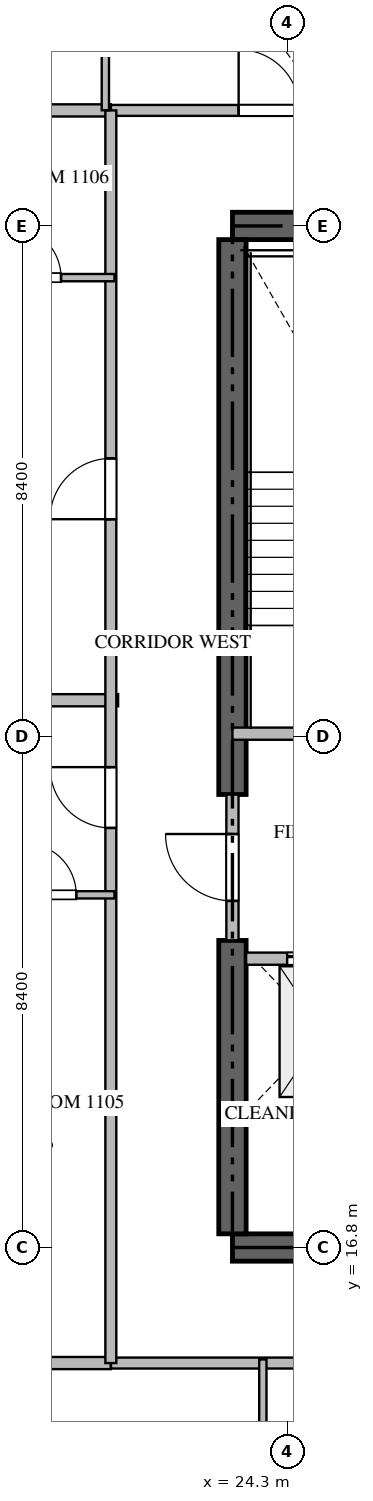
"""IFC4 building model, lengths in metres.
Left out: names, types, materials, properties, quantities, classifications, styles, units other than length and angle.
Written with IfcOpenShell. Run it as: python <this file> out.ifc"""

import sys

from ifc_helpers import new_model, si_unit, direction, frame, frame_2d, origin, place, context, subcontext, project, spatial, rectangle, extrude, source, transform, mapped, element, fill, save


model = new_model("IFC4")
c1 = context("Model", 3, precision=1e-05, world=origin(), true_north=direction((0.0, 1.0)))
c2 = subcontext(c1, "Body", "Model", "MODEL_VIEW")
j1 = project(units=[si_unit("LENGTHUNIT", "METRE"), si_unit("PLANEANGLEUNIT", "RADIAN")], contexts=[c1])
p1 = place(None, origin())
s1 = spatial("IfcSite", under=j1, at=p1, CompositionType="ELEMENT")
p2 = place(p1, origin())
s2 = spatial("IfcBuilding", under=s1, at=p2, CompositionType="ELEMENT")
p3 = place(p2, frame((0.0, 0.0, 49.2)))
s3 = spatial("IfcBuildingStorey", under=s2, at=p3, CompositionType="ELEMENT", Elevation=49.2)
for number, where, z_axis, x_axis in (
    (1, (23.4, 16.8, -0.26), (0.0, 0.0, 1.0), (1.0, 0.0, 0.0)),
    (2, (41.4, 33.6, -0.26), (0.0, 0.0, 1.0), (-1.0, 0.0, 0.0)),
):
    element("IfcWall", number, at=place(p3, frame(where, z_axis=z_axis, x_axis=x_axis)), inside=s3, PredefinedType="SHEAR", context=c2, shape_type="SweptSolid", body=[
        extrude(rectangle(XDim=18.0, YDim=0.45, at=frame_2d((9.0, 0.0))), origin(), (0.0, 0.0, 1.0), 3.748),
    ])
p4 = place(p3, frame((23.4, 17.025, -0.26), z_axis=(0.0, 0.0, 1.0), x_axis=(0.0, 1.0, 0.0)))
e3 = element("IfcWall", 3, at=p4, inside=s3, PredefinedType="SHEAR", context=c2, shape_type="SweptSolid", body=[
    extrude(rectangle(XDim=4.825, YDim=0.45, at=frame_2d((2.413, 0.0))), origin(), (0.0, 0.0, 1.0), 3.748),
])
p5 = place(p3, frame((23.4, 24.25, -0.26), z_axis=(0.0, 0.0, 1.0), x_axis=(0.0, 1.0, 0.0)))
e4 = element("IfcWall", 4, at=p5, inside=s3, PredefinedType="SHEAR", context=c2, shape_type="SweptSolid", body=[
    extrude(rectangle(XDim=9.125, YDim=0.45, at=frame_2d((4.562, 0.0))), origin(), (0.0, 0.0, 1.0), 3.748),
])
p6 = place(p3, frame((23.4, 25.25, 0.0), z_axis=(0.0, 0.0, 1.0), x_axis=(1.0, 0.0, 0.0)))
e5 = element("IfcWall", 5, at=p6, inside=s3, PredefinedType="STANDARD", context=c2, shape_type="SweptSolid", body=[
    extrude(rectangle(XDim=4.45, YDim=0.2, at=frame_2d((2.225, 0.0))), origin(), (0.0, 0.0, 1.0), 3.49),
])
p7 = place(p6, frame((1.65, 0.0, 0.0)))
e6 = element("IfcOpeningElement", 6, at=p7, cuts=e5, PredefinedType="OPENING", context=c2, shape_type="SweptSolid", body=[
    extrude(rectangle(XDim=1.1, YDim=2.15, at=frame_2d((0.55, 1.075))), frame((0.0, 0.11, 0.0), z_axis=(0.0, -1.0, 0.0), x_axis=(1.0, 0.0, 0.0)), (0.0, 0.0, 1.0), 0.22),
])
p8 = place(p3, frame((23.625, 21.55, 0.0), z_axis=(0.0, 0.0, 1.0), x_axis=(1.0, 0.0, 0.0)))
e7 = element("IfcWall", 7, at=p8, inside=s3, PredefinedType="STANDARD", context=c2, shape_type="SweptSolid", body=[
    extrude(rectangle(XDim=2.425, YDim=0.2, at=frame_2d((1.212, 0.0))), origin(), (0.0, 0.0, 1.0), 3.49),
])
p9 = place(p8, frame((0.675, 0.0, 0.0)))
e8 = element("IfcOpeningElement", 8, at=p9, cuts=e7, PredefinedType="OPENING", context=c2, shape_type="SweptSolid", body=[
    extrude(rectangle(XDim=1.2, YDim=2.2, at=frame_2d((0.6, 1.1))), frame((0.0, 0.11, 0.0), z_axis=(0.0, -1.0, 0.0), x_axis=(1.0, 0.0, 0.0)), (0.0, 0.0, 1.0), 0.22),
])
p10 = place(p3, frame((23.625, 19.05, 0.0), z_axis=(0.0, 0.0, 1.0), x_axis=(1.0, 0.0, 0.0)))
e9 = element("IfcWall", 9, at=p10, inside=s3, PredefinedType="STANDARD", context=c2, shape_type="SweptSolid", body=[
    extrude(rectangle(XDim=2.425, YDim=0.2, at=frame_2d((1.212, 0.0))), origin(), (0.0, 0.0, 1.0), 3.49),
])
p11 = place(p3, frame((23.4, 21.852, 0.0), z_axis=(0.0, 0.0, 1.0), x_axis=(0.0, 1.0, 0.0)))
e10 = element("IfcWall", 10, at=p11, inside=s3, PredefinedType="STANDARD", context=c2, shape_type="SweptSolid", body=[
    extrude(rectangle(XDim=2.396, YDim=0.2, at=frame_2d((1.198, 0.0))), origin(), (0.0, 0.0, 1.0), 3.49),
])
p12 = place(p11, frame((0.648, 0.0, 0.0)))
e11 = element("IfcOpeningElement", 11, at=p12, cuts=e10, PredefinedType="OPENING", context=c2, shape_type="SweptSolid", body=[
    extrude(rectangle(XDim=1.1, YDim=2.15, at=frame_2d((0.55, 1.075))), frame((0.0, 0.11, 0.0), z_axis=(0.0, -1.0, 0.0), x_axis=(1.0, 0.0, 0.0)), (0.0, 0.0, 1.0), 0.22),
])
p13 = place(p3, frame((6.082, 25.8, 0.0), z_axis=(0.0, 0.0, 1.0), x_axis=(1.0, 0.0, 0.0)))
e12 = element("IfcWall", 12, at=p13, inside=s3, PredefinedType="PARTITIONING", context=c2, shape_type="SweptSolid", body=[
    extrude(rectangle(XDim=15.438, YDim=0.2, at=frame_2d((7.719, 0.0))), origin(), (0.0, 0.0, 1.0), 3.49),
])
for number, where, z_axis, x_axis in (
    (13, (6.082, 14.9, 0.0), (0.0, 0.0, 1.0), (1.0, 0.0, 0.0)),
    (14, (6.082, 35.5, 0.0), (0.0, 0.0, 1.0), (1.0, 0.0, 0.0)),
):
    element("IfcWall", number, at=place(p3, frame(where, z_axis=z_axis, x_axis=x_axis)), inside=s3, PredefinedType="PARTITIONING", context=c2, shape_type="SweptSolid", body=[
        extrude(rectangle(XDim=15.318, YDim=0.2, at=frame_2d((7.659, 0.0))), origin(), (0.0, 0.0, 1.0), 3.49),
    ])
p14 = place(p3, frame((21.402, 14.9, 0.0), z_axis=(0.0, 0.0, 1.0), x_axis=(1.0, 0.0, 0.0)))
e15 = element("IfcWall", 15, at=p14, inside=s3, PredefinedType="PARTITIONING", context=c2, shape_type="SweptSolid", body=[
    extrude(rectangle(XDim=21.996, YDim=0.18, at=frame_2d((10.998, 0.0))), origin(), (0.0, 0.0, 1.0), 3.49),
])
p15 = place(p14, frame((15.222, 0.0, 0.0)))
e16 = element("IfcOpeningElement", 16, at=p15, cuts=e15, PredefinedType="OPENING", context=c2, shape_type="SweptSolid", body=[
    extrude(rectangle(XDim=1.0, YDim=2.15, at=frame_2d((0.5, 1.075))), frame((0.0, 0.1, 0.0), z_axis=(0.0, -1.0, 0.0), x_axis=(1.0, 0.0, 0.0)), (0.0, 0.0, 1.0), 0.2),
])
p16 = place(p3, frame((21.402, 35.5, 0.0), z_axis=(0.0, 0.0, 1.0), x_axis=(1.0, 0.0, 0.0)))
e17 = element("IfcWall", 17, at=p16, inside=s3, PredefinedType="PARTITIONING", context=c2, shape_type="SweptSolid", body=[
    extrude(rectangle(XDim=21.996, YDim=0.18, at=frame_2d((10.998, 0.0))), origin(), (0.0, 0.0, 1.0), 3.49),
])
p17 = place(p16, frame((2.1, 0.0, 0.0)))
e18 = element("IfcOpeningElement", 18, at=p17, cuts=e17, PredefinedType="OPENING", context=c2, shape_type="SweptSolid", body=[
    extrude(rectangle(XDim=1.0, YDim=2.15, at=frame_2d((0.5, 1.075))), frame((0.0, 0.1, 0.0), z_axis=(0.0, -1.0, 0.0), x_axis=(1.0, 0.0, 0.0)), (0.0, 0.0, 1.0), 0.2),
])
p18 = place(p16, frame((14.214, 0.0, 0.0)))
e19 = element("IfcOpeningElement", 19, at=p18, cuts=e17, PredefinedType="OPENING", context=c2, shape_type="SweptSolid", body=[
    extrude(rectangle(XDim=1.0, YDim=2.15, at=frame_2d((0.5, 1.075))), frame((0.0, 0.1, 0.0), z_axis=(0.0, -1.0, 0.0), x_axis=(1.0, 0.0, 0.0)), (0.0, 0.0, 1.0), 0.2),
])
p19 = place(p16, frame((18.896, 0.0, 0.0)))
e20 = element("IfcOpeningElement", 20, at=p19, cuts=e17, PredefinedType="OPENING", context=c2, shape_type="SweptSolid", body=[
    extrude(rectangle(XDim=1.0, YDim=2.15, at=frame_2d((0.5, 1.075))), frame((0.0, 0.1, 0.0), z_axis=(0.0, -1.0, 0.0), x_axis=(1.0, 0.0, 0.0)), (0.0, 0.0, 1.0), 0.2),
])
p20 = place(p3, frame((21.4, 14.9, 0.0), z_axis=(0.0, 0.0, 1.0), x_axis=(0.0, 1.0, 0.0)))
e21 = element("IfcWall", 21, at=p20, inside=s3, PredefinedType="PARTITIONING", context=c2, shape_type="SweptSolid", body=[
    extrude(rectangle(XDim=20.6, YDim=0.18, at=frame_2d((10.3, 0.0))), origin(), (0.0, 0.0, 1.0), 3.49),
])
p21 = place(p20, frame((8.8, 0.0, 0.0)))
e22 = element("IfcOpeningElement", 22, at=p21, cuts=e21, PredefinedType="OPENING", context=c2, shape_type="SweptSolid", body=[
    extrude(rectangle(XDim=1.0, YDim=2.15, at=frame_2d((0.5, 1.075))), frame((0.0, 0.1, 0.0), z_axis=(0.0, -1.0, 0.0), x_axis=(1.0, 0.0, 0.0)), (0.0, 0.0, 1.0), 0.2),
])
p22 = place(p20, frame((13.877, 0.0, 0.0)))
e23 = element("IfcOpeningElement", 23, at=p22, cuts=e21, PredefinedType="OPENING", context=c2, shape_type="SweptSolid", body=[
    extrude(rectangle(XDim=1.0, YDim=2.15, at=frame_2d((0.5, 1.075))), frame((0.0, 0.1, 0.0), z_axis=(0.0, -1.0, 0.0), x_axis=(1.0, 0.0, 0.0)), (0.0, 0.0, 1.0), 0.2),
])
p23 = place(p3, frame((23.9, 12.752, 0.0), z_axis=(0.0, 0.0, 1.0), x_axis=(0.0, 1.0, 0.0)))
e24 = element("IfcWall", 24, at=p23, inside=s3, PredefinedType="PARTITIONING", context=c2, shape_type="SweptSolid", body=[
    extrude(rectangle(XDim=2.208, YDim=0.12, at=frame_2d((1.104, 0.0))), origin(), (0.0, 0.0, 1.0), 3.49),
])
p24 = place(p3, frame((21.31, 38.25, 0.0), z_axis=(0.0, 0.0, 1.0), x_axis=(0.0, -1.0, 0.0)))
e25 = element("IfcWall", 25, at=p24, inside=s3, PredefinedType="PARTITIONING", context=c2, shape_type="SweptSolid", body=[
    extrude(rectangle(XDim=2.748, YDim=0.12, at=frame_2d((1.374, 0.0))), origin(), (0.0, 0.0, 1.0), 3.49),
])
p25 = place(p3, frame((19.352, 22.6, 0.0), z_axis=(0.0, 0.0, 1.0), x_axis=(1.0, 0.0, 0.0)))
e26 = element("IfcWall", 26, at=p25, inside=s3, PredefinedType="PARTITIONING", context=c2, shape_type="SweptSolid", body=[
    extrude(rectangle(XDim=2.108, YDim=0.12, at=frame_2d((1.054, 0.0))), origin(), (0.0, 0.0, 1.0), 3.49),
])
p26 = place(p25, frame((0.629, 0.0, 0.0)))
e27 = element("IfcOpeningElement", 27, at=p26, cuts=e26, PredefinedType="OPENING", context=c2, shape_type="SweptSolid", body=[
    extrude(rectangle(XDim=0.85, YDim=2.1, at=frame_2d((0.425, 1.05))), frame((0.0, 0.07, 0.0), z_axis=(0.0, -1.0, 0.0), x_axis=(1.0, 0.0, 0.0)), (0.0, 0.0, 1.0), 0.14),
])
p27 = place(p3, frame((18.852, 32.75, 0.0), z_axis=(0.0, 0.0, 1.0), x_axis=(1.0, 0.0, 0.0)))
e28 = element("IfcWall", 28, at=p27, inside=s3, PredefinedType="PARTITIONING", context=c2, shape_type="SweptSolid", body=[
    extrude(rectangle(XDim=2.608, YDim=0.12, at=frame_2d((1.304, 0.0))), origin(), (0.0, 0.0, 1.0), 3.49),
])
p28 = place(p27, frame((0.879, 0.0, 0.0)))
e29 = element("IfcOpeningElement", 29, at=p28, cuts=e28, PredefinedType="OPENING", context=c2, shape_type="SweptSolid", body=[
    extrude(rectangle(XDim=0.85, YDim=2.1, at=frame_2d((0.425, 1.05))), frame((0.0, 0.07, 0.0), z_axis=(0.0, -1.0, 0.0), x_axis=(1.0, 0.0, 0.0)), (0.0, 0.0, 1.0), 0.14),
])
m1 = source(origin(), c2, "Body", "SweptSolid", [
    extrude(rectangle(XDim=1.2, YDim=2.2, at=frame_2d((0.6, 1.1))), frame((0.0, 0.025, 0.0), z_axis=(0.0, -1.0, 0.0), x_axis=(1.0, 0.0, 0.0)), (0.0, 0.0, 1.0), 0.05),
])
p29 = place(p9, origin())
e30 = element("IfcDoor", 30, at=p29, inside=s3, OperationType="DOUBLE_DOOR_SLIDING", PredefinedType="DOOR", context=c2, shape_type="MappedRepresentation", body=[
    mapped(m1, transform((0.0, 0.0, 0.0), scale=1.0)),
])
fill(e8, e30)
m2 = source(origin(), c2, "Body", "SweptSolid", [
    extrude(rectangle(XDim=1.1, YDim=2.15, at=frame_2d((0.55, 1.075))), frame((0.0, 0.025, 0.0), z_axis=(0.0, -1.0, 0.0), x_axis=(1.0, 0.0, 0.0)), (0.0, 0.0, 1.0), 0.05),
])
p30 = place(p12, origin())
e31 = element("IfcDoor", 31, at=p30, inside=s3, OperationType="SINGLE_SWING_RIGHT", PredefinedType="DOOR", context=c2, shape_type="MappedRepresentation", body=[
    mapped(m2, transform((0.0, 0.0, 0.0), scale=1.0)),
])
fill(e11, e31)
m3 = source(origin(), c2, "Body", "SweptSolid", [
    extrude(rectangle(XDim=1.0, YDim=2.15, at=frame_2d((0.5, 1.075))), frame((0.0, 0.025, 0.0), z_axis=(0.0, -1.0, 0.0), x_axis=(1.0, 0.0, 0.0)), (0.0, 0.0, 1.0), 0.05),
])
p31 = place(p17, origin())
e32 = element("IfcDoor", 32, at=p31, inside=s3, OperationType="SINGLE_SWING_LEFT", PredefinedType="DOOR", context=c2, shape_type="MappedRepresentation", body=[
    mapped(m3, transform((0.0, 0.0, 0.0), scale=1.0)),
])
fill(e18, e32)
p32 = place(p21, origin())
e33 = element("IfcDoor", 33, at=p32, inside=s3, OperationType="SINGLE_SWING_RIGHT", PredefinedType="DOOR", context=c2, shape_type="MappedRepresentation", body=[
    mapped(m3, transform((0.0, 0.0, 0.0), scale=1.0)),
])
fill(e22, e33)
p33 = place(p22, origin())
e34 = element("IfcDoor", 34, at=p33, inside=s3, OperationType="SINGLE_SWING_LEFT", PredefinedType="DOOR", context=c2, shape_type="MappedRepresentation", body=[
    mapped(m3, transform((0.0, 0.0, 0.0), scale=1.0)),
])
fill(e23, e34)
m4 = source(origin(), c2, "Body", "SweptSolid", [
    extrude(rectangle(XDim=0.85, YDim=2.1, at=frame_2d((0.425, 1.05))), frame((0.0, 0.025, 0.0), z_axis=(0.0, -1.0, 0.0), x_axis=(1.0, 0.0, 0.0)), (0.0, 0.0, 1.0), 0.05),
])
p34 = place(p26, origin())
e35 = element("IfcDoor", 35, at=p34, inside=s3, OperationType="SINGLE_SWING_LEFT", PredefinedType="DOOR", context=c2, shape_type="MappedRepresentation", body=[
    mapped(m4, transform((0.0, 0.0, 0.0), scale=1.0)),
])
fill(e27, e35)
p35 = place(p28, origin())
e36 = element("IfcDoor", 36, at=p35, inside=s3, OperationType="SINGLE_SWING_LEFT", PredefinedType="DOOR", context=c2, shape_type="MappedRepresentation", body=[
    mapped(m4, transform((0.0, 0.0, 0.0), scale=1.0)),
])
fill(e29, e36)
save(model, sys.argv[1])
